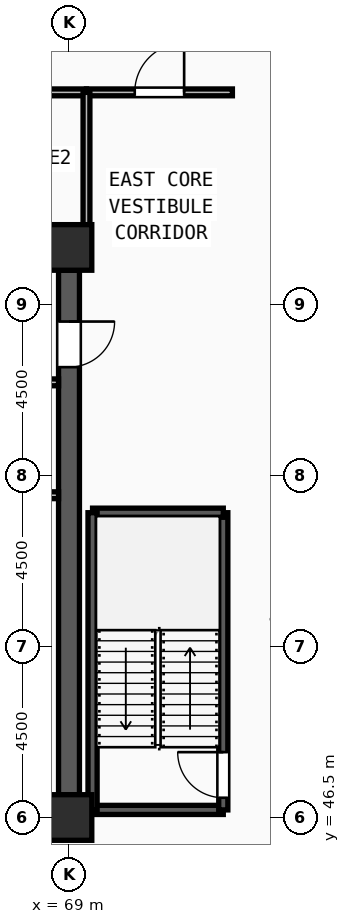
"""IFC4 building model, lengths in metres.
Left out: names, types, materials, properties, quantities, classifications, styles, units other than length and angle.
Written with IfcOpenShell. Run it as: python <this file> out.ifc"""

import sys

from ifc_helpers import new_model, si_unit, direction, frame, frame_2d, origin, origin_2d, place, context, subcontext, project, spatial, rectangle, extrude, source, transform, mapped, element, fill, save


model = new_model("IFC4")
c1 = context("Model", 3, precision=1e-05, world=origin(), true_north=direction((0.0, 1.0)))
c2 = subcontext(c1, "Body", "Model", "MODEL_VIEW")
j1 = project(units=[si_unit("LENGTHUNIT", "METRE"), si_unit("PLANEANGLEUNIT", "RADIAN")], contexts=[c1])
p1 = place(None, origin())
s1 = spatial("IfcSite", under=j1, at=p1, CompositionType="ELEMENT")
p2 = place(p1, origin())
s2 = spatial("IfcBuilding", under=s1, at=p2, CompositionType="ELEMENT")
p3 = place(p2, frame((0.0, 0.0, 297.75)))
s3 = spatial("IfcBuildingStorey", under=s2, at=p3, CompositionType="ELEMENT", Elevation=297.75)
m1 = source(origin(), c2, "Body", "SweptSolid", [
    extrude(rectangle(XDim=1.2, YDim=1.2, at=origin_2d()), origin(), (0.0, 0.0, 1.0), 3.75),
])
for number, where, z_axis, x_axis in (
    (1, (69.0, 46.5, 0.0), (0.0, 0.0, 1.0), (1.0, 0.0, 0.0)),
    (2, (69.0, 61.5, 0.0), (0.0, 0.0, 1.0), (1.0, 0.0, 0.0)),
):
    element("IfcColumn", number, at=place(p3, frame(where, z_axis=z_axis, x_axis=x_axis)), inside=s3, PredefinedType="COLUMN", context=c2, shape_type="MappedRepresentation", body=[
        mapped(m1, transform((0.0, 0.0, 0.0), x_axis=(1.0, 0.0, 0.0), y_axis=(0.0, 1.0, 0.0), z_axis=(0.0, 0.0, 1.0), scale=1.0)),
    ])
p4 = place(p3, frame((69.0, 60.9, 0.0), z_axis=(0.0, 0.0, 1.0), x_axis=(0.0, -1.0, 0.0)))
e3 = element("IfcWall", 3, at=p4, inside=s3, PredefinedType="SHEAR", context=c2, shape_type="SweptSolid", body=[
    extrude(rectangle(XDim=13.8, YDim=0.55, at=frame_2d((6.9, 0.0))), origin(), (0.0, 0.0, 1.0), 3.57),
])
m2 = source(origin(), c2, "Body", "SweptSolid", [
    extrude(rectangle(XDim=1.2, YDim=2.2, at=frame_2d((0.6, 1.1))), frame((0.0, 0.285, 0.0), z_axis=(0.0, -1.0, 0.0), x_axis=(1.0, 0.0, 0.0)), (0.0, 0.0, 1.0), 0.57),
])
p5 = place(p4, frame((1.35, 0.0, 0.0)))
e4 = element("IfcOpeningElement", 4, at=p5, cuts=e3, PredefinedType="OPENING", context=c2, shape_type="MappedRepresentation", body=[
    mapped(m2, transform((0.0, 0.0, 0.0), x_axis=(1.0, 0.0, 0.0), y_axis=(0.0, 1.0, 0.0), z_axis=(0.0, 0.0, 1.0), scale=1.0)),
])
p6 = place(p3, frame((69.62, 46.7, 0.0), z_axis=(0.0, 0.0, 1.0), x_axis=(1.0, 0.0, 0.0)))
e5 = element("IfcWall", 5, at=p6, inside=s3, PredefinedType="SOLIDWALL", context=c2, shape_type="SweptSolid", body=[
    extrude(rectangle(XDim=3.44, YDim=0.24, at=frame_2d((1.72, 0.0))), origin(), (0.0, 0.0, 1.0), 3.57),
])
p7 = place(p3, frame((73.06, 46.7, 0.0), z_axis=(0.0, 0.0, 1.0), x_axis=(0.0, 1.0, 0.0)))
e6 = element("IfcWall", 6, at=p7, inside=s3, PredefinedType="SOLIDWALL", context=c2, shape_type="SweptSolid", body=[
    extrude(rectangle(XDim=7.82, YDim=0.24, at=frame_2d((3.91, 0.0))), origin(), (0.0, 0.0, 1.0), 3.57),
])
m3 = source(origin(), c2, "Body", "SweptSolid", [
    extrude(rectangle(XDim=1.2, YDim=2.2, at=frame_2d((0.6, 1.1))), frame((0.0, 0.13, 0.0), z_axis=(0.0, -1.0, 0.0), x_axis=(1.0, 0.0, 0.0)), (0.0, 0.0, 1.0), 0.26),
])
p8 = place(p7, frame((0.32, 0.0, 0.0)))
e7 = element("IfcOpeningElement", 7, at=p8, cuts=e6, PredefinedType="OPENING", context=c2, shape_type="MappedRepresentation", body=[
    mapped(m3, transform((0.0, 0.0, 0.0), x_axis=(1.0, 0.0, 0.0), y_axis=(0.0, 1.0, 0.0), z_axis=(0.0, 0.0, 1.0), scale=1.0)),
])
p9 = place(p3, frame((73.06, 54.52, 0.0), z_axis=(0.0, 0.0, 1.0), x_axis=(-1.0, 0.0, 0.0)))
e8 = element("IfcWall", 8, at=p9, inside=s3, PredefinedType="SOLIDWALL", context=c2, shape_type="SweptSolid", body=[
    extrude(rectangle(XDim=3.44, YDim=0.24, at=frame_2d((1.72, 0.0))), origin(), (0.0, 0.0, 1.0), 3.57),
])
p10 = place(p3, frame((69.62, 54.52, 0.0), z_axis=(0.0, 0.0, 1.0), x_axis=(0.0, -1.0, 0.0)))
e9 = element("IfcWall", 9, at=p10, inside=s3, PredefinedType="SOLIDWALL", context=c2, shape_type="SweptSolid", body=[
    extrude(rectangle(XDim=7.82, YDim=0.24, at=frame_2d((3.91, 0.0))), origin(), (0.0, 0.0, 1.0), 3.57),
])
p11 = place(p3, frame((64.54, 54.98, 0.0), z_axis=(0.0, 0.0, 1.0), x_axis=(1.0, 0.0, 0.0)))
e10 = element("IfcWall", 10, at=p11, inside=s3, PredefinedType="PARTITIONING", context=c2, shape_type="SweptSolid", body=[
    extrude(rectangle(XDim=4.185, YDim=0.18, at=frame_2d((2.093, 0.0))), origin(), (0.0, 0.0, 1.0), 3.57),
])
m4 = source(origin(), c2, "Body", "SweptSolid", [
    extrude(rectangle(XDim=1.0, YDim=2.2, at=frame_2d((0.5, 1.1))), frame((0.0, 0.1, 0.0), z_axis=(0.0, -1.0, 0.0), x_axis=(1.0, 0.0, 0.0)), (0.0, 0.0, 1.0), 0.2),
])
p12 = place(p11, frame((1.495, 0.0, 0.0)))
e11 = element("IfcOpeningElement", 11, at=p12, cuts=e10, PredefinedType="OPENING", context=c2, shape_type="MappedRepresentation", body=[
    mapped(m4, transform((0.0, 0.0, 0.0), x_axis=(1.0, 0.0, 0.0), y_axis=(0.0, 1.0, 0.0), z_axis=(0.0, 0.0, 1.0), scale=1.0)),
])
p13 = place(p3, frame((65.92, 65.58, 0.0), z_axis=(0.0, 0.0, 1.0), x_axis=(1.0, 0.0, 0.0)))
e12 = element("IfcWall", 12, at=p13, inside=s3, PredefinedType="PARTITIONING", context=c2, shape_type="SweptSolid", body=[
    extrude(rectangle(XDim=3.54, YDim=0.18, at=frame_2d((1.77, 0.0))), origin(), (0.0, 0.0, 1.0), 3.57),
])
p14 = place(p13, frame((1.27, 0.0, 0.0)))
e13 = element("IfcOpeningElement", 13, at=p14, cuts=e12, PredefinedType="OPENING", context=c2, shape_type="MappedRepresentation", body=[
    mapped(m4, transform((0.0, 0.0, 0.0), x_axis=(1.0, 0.0, 0.0), y_axis=(0.0, 1.0, 0.0), z_axis=(0.0, 0.0, 1.0), scale=1.0)),
])
p15 = place(p3, frame((69.46, 65.58, 0.0), z_axis=(0.0, 0.0, 1.0), x_axis=(1.0, 0.0, 0.0)))
e14 = element("IfcWall", 14, at=p15, inside=s3, PredefinedType="PARTITIONING", context=c2, shape_type="SweptSolid", body=[
    extrude(rectangle(XDim=3.84, YDim=0.18, at=frame_2d((1.92, 0.0))), origin(), (0.0, 0.0, 1.0), 3.57),
])
m5 = source(origin(), c2, "Body", "SweptSolid", [
    extrude(rectangle(XDim=1.3, YDim=2.2, at=frame_2d((0.65, 1.1))), frame((0.0, 0.1, 0.0), z_axis=(0.0, -1.0, 0.0), x_axis=(1.0, 0.0, 0.0)), (0.0, 0.0, 1.0), 0.2),
])
p16 = place(p15, frame((1.27, 0.0, 0.0)))
e15 = element("IfcOpeningElement", 15, at=p16, cuts=e14, PredefinedType="OPENING", context=c2, shape_type="MappedRepresentation", body=[
    mapped(m5, transform((0.0, 0.0, 0.0), x_axis=(1.0, 0.0, 0.0), y_axis=(0.0, 1.0, 0.0), z_axis=(0.0, 0.0, 1.0), scale=1.0)),
])
p17 = place(p3, frame((69.46, 61.95, 0.0), z_axis=(0.0, 0.0, 1.0), x_axis=(0.0, 1.0, 0.0)))
e16 = element("IfcWall", 16, at=p17, inside=s3, PredefinedType="PARTITIONING", context=c2, shape_type="SweptSolid", body=[
    extrude(rectangle(XDim=3.63, YDim=0.18, at=frame_2d((1.815, 0.0))), origin(), (0.0, 0.0, 1.0), 3.57),
])
p18 = place(p3, frame((67.4, 57.95, 0.0), z_axis=(0.0, 0.0, 1.0), x_axis=(1.0, 0.0, 0.0)))
e17 = element("IfcWall", 17, at=p18, inside=s3, PredefinedType="PARTITIONING", context=c2, shape_type="SweptSolid", body=[
    extrude(rectangle(XDim=1.325, YDim=0.18, at=frame_2d((0.663, 0.0))), origin(), (0.0, 0.0, 1.0), 3.57),
])
m6 = source(origin(), c2, "Body", "SweptSolid", [
    extrude(rectangle(XDim=1.2, YDim=2.2, at=frame_2d((0.6, 1.1))), frame((0.0, 0.025, 0.0), z_axis=(0.0, -1.0, 0.0), x_axis=(1.0, 0.0, 0.0)), (0.0, 0.0, 1.0), 0.05),
])
p19 = place(p5, origin())
e18 = element("IfcDoor", 18, at=p19, inside=s3, OperationType="SINGLE_SWING_LEFT", PredefinedType="DOOR", context=c2, shape_type="MappedRepresentation", body=[
    mapped(m6, transform((0.0, 0.0, 0.0), x_axis=(1.0, 0.0, 0.0), y_axis=(0.0, 1.0, 0.0), z_axis=(0.0, 0.0, 1.0), scale=1.0)),
])
fill(e4, e18)
p20 = place(p8, origin())
e19 = element("IfcDoor", 19, at=p20, inside=s3, OperationType="SINGLE_SWING_RIGHT", PredefinedType="DOOR", context=c2, shape_type="MappedRepresentation", body=[
    mapped(m6, transform((0.0, 0.0, 0.0), x_axis=(1.0, 0.0, 0.0), y_axis=(0.0, 1.0, 0.0), z_axis=(0.0, 0.0, 1.0), scale=1.0)),
])
fill(e7, e19)
m7 = source(origin(), c2, "Body", "SweptSolid", [
    extrude(rectangle(XDim=1.3, YDim=2.2, at=frame_2d((0.65, 1.1))), frame((0.0, 0.025, 0.0), z_axis=(0.0, -1.0, 0.0), x_axis=(1.0, 0.0, 0.0)), (0.0, 0.0, 1.0), 0.05),
])
p21 = place(p16, origin())
e20 = element("IfcDoor", 20, at=p21, inside=s3, OperationType="SINGLE_SWING_RIGHT", PredefinedType="DOOR", context=c2, shape_type="MappedRepresentation", body=[
    mapped(m7, transform((0.0, 0.0, 0.0), x_axis=(1.0, 0.0, 0.0), y_axis=(0.0, 1.0, 0.0), z_axis=(0.0, 0.0, 1.0), scale=1.0)),
])
fill(e15, e20)
save(model, sys.argv[1])
